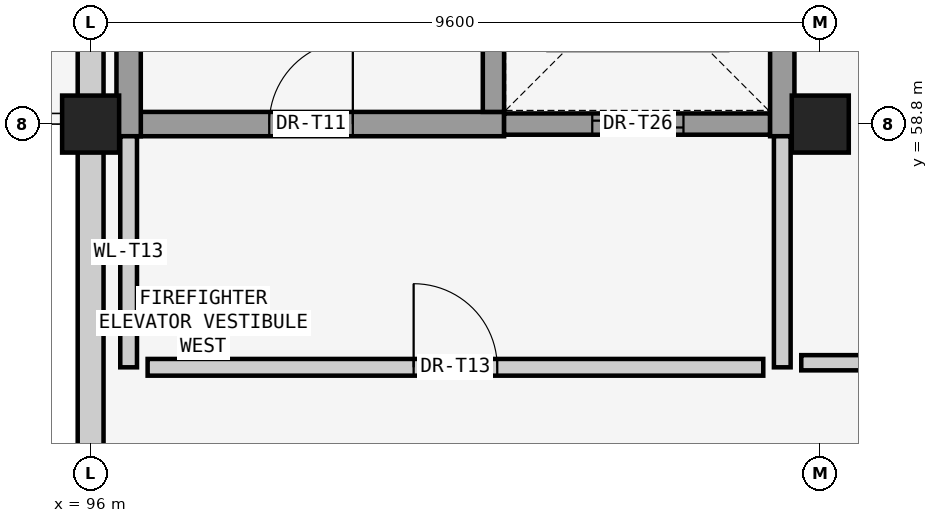
"""IFC4 building model, lengths in metres.
Left out: names, types, materials, properties, quantities, classifications, styles, units other than length and angle.
Written with IfcOpenShell. Run it as: python <this file> out.ifc"""

import sys

from ifc_helpers import new_model, si_unit, direction, frame, frame_2d, origin, origin_2d, place, context, subcontext, project, spatial, rectangle, extrude, element, fill, save


model = new_model("IFC4")
c1 = context("Model", 3, precision=1e-05, world=origin(), true_north=direction((0.0, 1.0)))
c2 = subcontext(c1, "Body", "Model", "MODEL_VIEW")
j1 = project(units=[si_unit("LENGTHUNIT", "METRE"), si_unit("PLANEANGLEUNIT", "RADIAN")], contexts=[c1])
p1 = place(None, origin())
s1 = spatial("IfcSite", under=j1, at=p1, CompositionType="ELEMENT")
p2 = place(p1, origin())
s2 = spatial("IfcBuilding", under=s1, at=p2, CompositionType="ELEMENT")
p3 = place(p2, frame((0.0, 0.0, 10.2)))
s3 = spatial("IfcBuildingStorey", under=s2, at=p3, CompositionType="ELEMENT", Elevation=10.2)
p4 = place(p3, frame((96.0, 58.8, 0.0), z_axis=(0.0, 0.0, 1.0), x_axis=(1.0, 0.0, 0.0)))
e1 = element("IfcColumn", 1, at=p4, inside=s3, PredefinedType="COLUMN", context=c2, shape_type="SweptSolid", body=[
    extrude(rectangle(XDim=0.75, YDim=0.75, at=origin_2d()), origin(), (0.0, 0.0, 1.0), 4.53),
])
p5 = place(p3, frame((105.6, 58.8, 0.0), z_axis=(0.0, 0.0, 1.0), x_axis=(1.0, 0.0, 0.0)))
e2 = element("IfcColumn", 2, at=p5, inside=s3, PredefinedType="COLUMN", context=c2, shape_type="SweptSolid", body=[
    extrude(rectangle(XDim=0.75, YDim=0.75, at=origin_2d()), origin(), (0.0, 0.0, 1.0), 4.56),
])
p6 = place(p3, frame((96.0, 52.012, 0.0), z_axis=(0.0, 0.0, 1.0), x_axis=(0.0, 1.0, 0.0)))
e3 = element("IfcWall", 3, at=p6, inside=s3, PredefinedType="SOLIDWALL", context=c2, shape_type="SweptSolid", body=[
    extrude(rectangle(XDim=15.158, YDim=0.34, at=frame_2d((7.579, 0.0))), origin(), (0.0, 0.0, 1.0), 3.807),
])
p7 = place(p3, frame((96.66, 58.8, 0.0), z_axis=(0.0, 0.0, 1.0), x_axis=(1.0, 0.0, 0.0)))
e4 = element("IfcWall", 4, at=p7, inside=s3, PredefinedType="SHEAR", context=c2, shape_type="SweptSolid", body=[
    extrude(rectangle(XDim=4.78, YDim=0.32, at=frame_2d((2.39, 0.0))), origin(), (0.0, 0.0, 1.0), 4.54),
])
p8 = place(p7, frame((1.69, 0.0, 0.0)))
e5 = element("IfcOpeningElement", 5, at=p8, cuts=e4, PredefinedType="OPENING", context=c2, shape_type="SweptSolid", body=[
    extrude(rectangle(XDim=1.1, YDim=2.2, at=frame_2d((0.55, 1.1))), frame((0.0, 0.17, 0.0), z_axis=(0.0, -1.0, 0.0), x_axis=(1.0, 0.0, 0.0)), (0.0, 0.0, 1.0), 0.34),
])
p9 = place(p3, frame((101.44, 58.8, 0.0), z_axis=(0.0, 0.0, 1.0), x_axis=(1.0, 0.0, 0.0)))
e6 = element("IfcWall", 6, at=p9, inside=s3, PredefinedType="SHEAR", context=c2, shape_type="SweptSolid", body=[
    extrude(rectangle(XDim=3.5, YDim=0.28, at=frame_2d((1.75, 0.0))), origin(), (0.0, 0.0, 1.0), 4.54),
])
p10 = place(p9, frame((1.16, 0.0, 0.0)))
e7 = element("IfcOpeningElement", 7, at=p10, cuts=e6, PredefinedType="OPENING", context=c2, shape_type="SweptSolid", body=[
    extrude(rectangle(XDim=1.2, YDim=2.2, at=frame_2d((0.6, 1.1))), frame((0.0, 0.15, 0.0), z_axis=(0.0, -1.0, 0.0), x_axis=(1.0, 0.0, 0.0)), (0.0, 0.0, 1.0), 0.3),
])
for number, where, z_axis, x_axis in (
    (8, (96.5, 67.0, 0.0), (0.0, 0.0, 1.0), (0.0, -1.0, 0.0)),
    (9, (105.1, 58.64, 0.0), (0.0, 0.0, 1.0), (0.0, 1.0, 0.0)),
):
    element("IfcWall", number, at=place(p3, frame(where, z_axis=z_axis, x_axis=x_axis)), inside=s3, PredefinedType="SHEAR", context=c2, shape_type="SweptSolid", body=[
        extrude(rectangle(XDim=8.36, YDim=0.32, at=frame_2d((4.18, 0.0))), origin(), (0.0, 0.0, 1.0), 4.54),
    ])
p11 = place(p3, frame((101.3, 58.96, 0.0), z_axis=(0.0, 0.0, 1.0), x_axis=(0.0, 1.0, 0.0)))
e10 = element("IfcWall", 10, at=p11, inside=s3, PredefinedType="SHEAR", context=c2, shape_type="SweptSolid", body=[
    extrude(rectangle(XDim=7.72, YDim=0.28, at=frame_2d((3.86, 0.0))), origin(), (0.0, 0.0, 1.0), 4.54),
])
for number, where, z_axis, x_axis in (
    (11, (96.5, 55.6, 0.0), (0.0, 0.0, 1.0), (0.0, 1.0, 0.0)),
    (12, (105.1, 55.6, 0.0), (0.0, 0.0, 1.0), (0.0, 1.0, 0.0)),
):
    element("IfcWall", number, at=place(p3, frame(where, z_axis=z_axis, x_axis=x_axis)), inside=s3, PredefinedType="SOLIDWALL", context=c2, shape_type="SweptSolid", body=[
        extrude(rectangle(XDim=3.04, YDim=0.22, at=frame_2d((1.52, 0.0))), origin(), (0.0, 0.0, 1.0), 4.32),
    ])
p12 = place(p3, frame((96.75, 55.6, 0.0), z_axis=(0.0, 0.0, 1.0), x_axis=(1.0, 0.0, 0.0)))
e13 = element("IfcWall", 13, at=p12, inside=s3, PredefinedType="SOLIDWALL", context=c2, shape_type="SweptSolid", body=[
    extrude(rectangle(XDim=8.1, YDim=0.22, at=frame_2d((4.05, 0.0))), origin(), (0.0, 0.0, 1.0), 4.32),
])
p13 = place(p12, frame((3.5, 0.0, 0.0)))
e14 = element("IfcOpeningElement", 14, at=p13, cuts=e13, PredefinedType="OPENING", context=c2, shape_type="SweptSolid", body=[
    extrude(rectangle(XDim=1.1, YDim=2.2, at=frame_2d((0.55, 1.1))), frame((0.0, 0.12, 0.0), z_axis=(0.0, -1.0, 0.0), x_axis=(1.0, 0.0, 0.0)), (0.0, 0.0, 1.0), 0.24),
])
p14 = place(p3, frame((105.35, 55.66, 0.0), z_axis=(0.0, 0.0, 1.0), x_axis=(1.0, 0.0, 0.0)))
e15 = element("IfcWall", 15, at=p14, inside=s3, PredefinedType="SOLIDWALL", context=c2, shape_type="SweptSolid", body=[
    extrude(rectangle(XDim=19.65, YDim=0.2, at=frame_2d((9.825, 0.0))), origin(), (0.0, 0.0, 1.0), 4.48),
])
p15 = place(p14, frame((9.35, 0.0, 0.0)))
e16 = element("IfcOpeningElement", 16, at=p15, cuts=e15, PredefinedType="OPENING", context=c2, shape_type="SweptSolid", body=[
    extrude(rectangle(XDim=0.95, YDim=2.15, at=frame_2d((0.475, 1.075))), frame((0.0, 0.11, 0.0), z_axis=(0.0, -1.0, 0.0), x_axis=(1.0, 0.0, 0.0)), (0.0, 0.0, 1.0), 0.22),
])
p16 = place(p8, origin())
e17 = element("IfcDoor", 17, at=p16, inside=s3, OperationType="SINGLE_SWING_RIGHT", PredefinedType="DOOR", context=c2, shape_type="SweptSolid", body=[
    extrude(rectangle(XDim=1.1, YDim=2.2, at=frame_2d((0.55, 1.1))), frame((0.0, 0.025, 0.0), z_axis=(0.0, -1.0, 0.0), x_axis=(1.0, 0.0, 0.0)), (0.0, 0.0, 1.0), 0.05),
])
fill(e5, e17)
p17 = place(p10, origin())
e18 = element("IfcDoor", 18, at=p17, inside=s3, OperationType="SLIDING_TO_RIGHT", PredefinedType="DOOR", context=c2, shape_type="SweptSolid", body=[
    extrude(rectangle(XDim=1.2, YDim=2.2, at=frame_2d((0.6, 1.1))), frame((0.0, 0.025, 0.0), z_axis=(0.0, -1.0, 0.0), x_axis=(1.0, 0.0, 0.0)), (0.0, 0.0, 1.0), 0.05),
])
fill(e7, e18)
p18 = place(p13, origin())
e19 = element("IfcDoor", 19, at=p18, inside=s3, OperationType="SINGLE_SWING_LEFT", PredefinedType="DOOR", context=c2, shape_type="SweptSolid", body=[
    extrude(rectangle(XDim=1.1, YDim=2.2, at=frame_2d((0.55, 1.1))), frame((0.0, 0.025, 0.0), z_axis=(0.0, -1.0, 0.0), x_axis=(1.0, 0.0, 0.0)), (0.0, 0.0, 1.0), 0.05),
])
fill(e14, e19)
save(model, sys.argv[1])
